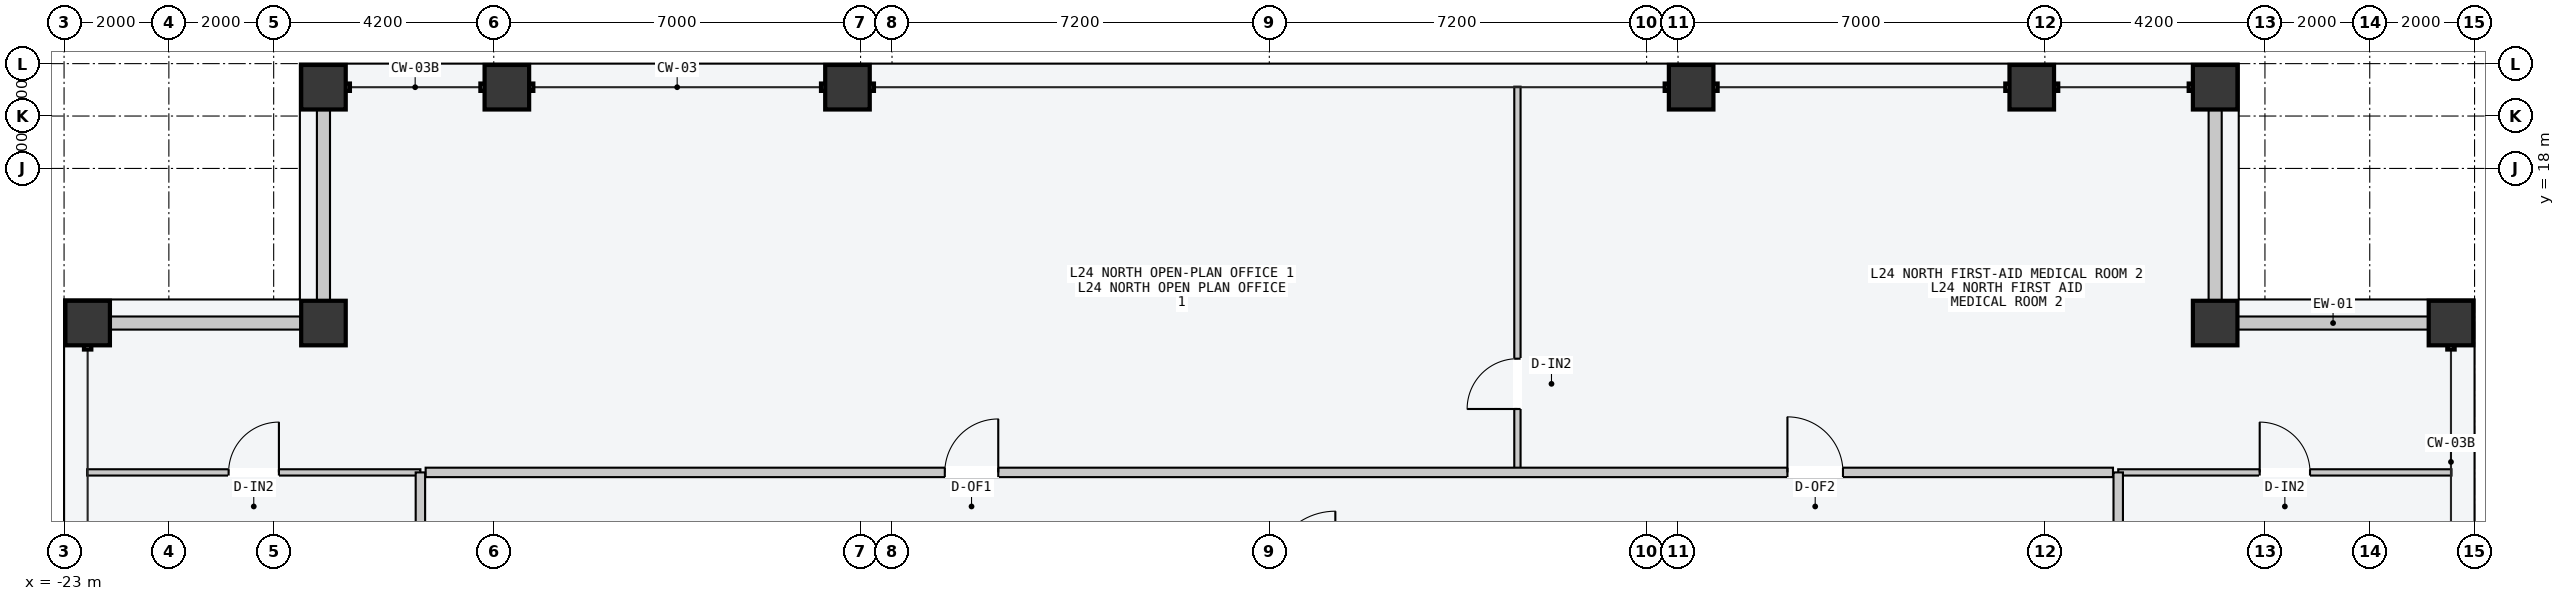
"""IFC4 building model, lengths in metres.
Left out: names, types, materials, properties, quantities, classifications, styles, units other than length and angle.
Written with IfcOpenShell. Run it as: python <this file> out.ifc"""

import sys

from ifc_helpers import new_model, si_unit, direction, frame, frame_2d, origin, origin_2d, place, context, subcontext, project, spatial, rectangle, hollow_rectangle, extrude, element, fill, save


model = new_model("IFC4")
c1 = context("Model", 3, precision=1e-05, world=origin(), true_north=direction((0.0, 1.0)))
c2 = subcontext(c1, "Body", "Model", "MODEL_VIEW")
j1 = project(units=[si_unit("LENGTHUNIT", "METRE"), si_unit("PLANEANGLEUNIT", "RADIAN")], contexts=[c1])
p1 = place(None, origin())
s1 = spatial("IfcSite", under=j1, at=p1, CompositionType="ELEMENT")
p2 = place(p1, origin())
s2 = spatial("IfcBuilding", under=s1, at=p2, CompositionType="ELEMENT")
p3 = place(p2, frame((0.0, 0.0, 95.4)))
s3 = spatial("IfcBuildingStorey", under=s2, at=p3, CompositionType="ELEMENT", Elevation=95.4)
for number, where, z_axis, x_axis in (
    (1, (-18.05, 19.55, 0.0), (0.0, 0.0, 1.0), (1.0, 0.0, 0.0)),
    (2, (-14.55, 19.55, 0.0), (0.0, 0.0, 1.0), (1.0, 0.0, 0.0)),
    (3, (-8.05, 19.55, 0.0), (0.0, 0.0, 1.0), (1.0, 0.0, 0.0)),
    (4, (8.05, 19.55, 0.0), (0.0, 0.0, 1.0), (1.0, 0.0, 0.0)),
    (5, (14.55, 19.55, 0.0), (0.0, 0.0, 1.0), (1.0, 0.0, 0.0)),
    (6, (18.05, 19.55, 0.0), (0.0, 0.0, 1.0), (1.0, 0.0, 0.0)),
    (7, (-22.55, 15.05, 0.0), (0.0, 0.0, 1.0), (0.0, 1.0, 0.0)),
    (8, (22.55, 15.05, 0.0), (0.0, 0.0, 1.0), (0.0, 1.0, 0.0)),
    (9, (-18.05, 15.05, 0.0), (0.0, 0.0, 1.0), (1.0, 0.0, 0.0)),
    (10, (18.05, 15.05, 0.0), (0.0, 0.0, 1.0), (1.0, 0.0, 0.0)),
):
    element("IfcColumn", number, at=place(p3, frame(where, z_axis=z_axis, x_axis=x_axis)), inside=s3, PredefinedType="COLUMN", context=c2, shape_type="SweptSolid", body=[
        extrude(hollow_rectangle(XDim=0.85, YDim=0.85, WallThickness=0.04, at=origin_2d()), origin(), (0.0, 0.0, 1.0), 3.6),
    ])
for number, where, z_axis, x_axis in (
    (11, (-22.115, 15.05, 0.0), (0.0, 0.0, 1.0), (1.0, 0.0, 0.0)),
    (12, (-18.05, 15.485, 0.0), (0.0, 0.0, 1.0), (0.0, 1.0, 0.0)),
    (13, (18.485, 15.05, 0.0), (0.0, 0.0, 1.0), (1.0, 0.0, 0.0)),
    (14, (18.05, 15.485, 0.0), (0.0, 0.0, 1.0), (0.0, 1.0, 0.0)),
):
    element("IfcWall", number, at=place(p3, frame(where, z_axis=z_axis, x_axis=x_axis)), inside=s3, PredefinedType="STANDARD", context=c2, shape_type="SweptSolid", body=[
        extrude(rectangle(XDim=3.63, YDim=0.25, at=frame_2d((1.815, 0.0))), origin(), (0.0, 0.0, 1.0), 2.75),
    ])
p4 = place(p3, frame((4.735, 12.26, 0.0), z_axis=(0.0, 0.0, 1.0), x_axis=(0.0, 1.0, 0.0)))
e15 = element("IfcWall", 15, at=p4, inside=s3, PredefinedType="PARTITIONING", context=c2, shape_type="SweptSolid", body=[
    extrude(rectangle(XDim=7.3, YDim=0.12, at=frame_2d((3.65, 0.0))), origin(), (0.0, 0.0, 1.0), 3.4),
])
p5 = place(p4, frame((1.15, 0.0, 0.0)))
e16 = element("IfcOpeningElement", 16, at=p5, cuts=e15, PredefinedType="OPENING", context=c2, shape_type="SweptSolid", body=[
    extrude(rectangle(XDim=0.96, YDim=2.18, at=frame_2d((0.48, 1.09))), frame((0.0, 0.07, 0.0), z_axis=(0.0, -1.0, 0.0), x_axis=(1.0, 0.0, 0.0)), (0.0, 0.0, 1.0), 0.14),
])
p6 = place(p3, frame((-16.1, 12.2, 0.0), z_axis=(0.0, 0.0, 1.0), x_axis=(1.0, 0.0, 0.0)))
e17 = element("IfcWall", 17, at=p6, inside=s3, PredefinedType="PARTITIONING", context=c2, shape_type="SweptSolid", body=[
    extrude(rectangle(XDim=32.2, YDim=0.18, at=frame_2d((16.1, 0.0))), origin(), (0.0, 0.0, 1.0), 3.4),
])
p7 = place(p6, frame((9.907, 0.0, 0.0)))
e18 = element("IfcOpeningElement", 18, at=p7, cuts=e17, PredefinedType="OPENING", context=c2, shape_type="SweptSolid", body=[
    extrude(rectangle(XDim=1.02, YDim=2.2, at=frame_2d((0.51, 1.1))), frame((0.0, 0.1, 0.0), z_axis=(0.0, -1.0, 0.0), x_axis=(1.0, 0.0, 0.0)), (0.0, 0.0, 1.0), 0.2),
])
p8 = place(p6, frame((25.987, 0.0, 0.0)))
e19 = element("IfcOpeningElement", 19, at=p8, cuts=e17, PredefinedType="OPENING", context=c2, shape_type="SweptSolid", body=[
    extrude(rectangle(XDim=1.06, YDim=2.2, at=frame_2d((0.53, 1.1))), frame((0.0, 0.1, 0.0), z_axis=(0.0, -1.0, 0.0), x_axis=(1.0, 0.0, 0.0)), (0.0, 0.0, 1.0), 0.2),
])
p9 = place(p3, frame((-22.56, 12.2, 0.0), z_axis=(0.0, 0.0, 1.0), x_axis=(1.0, 0.0, 0.0)))
e20 = element("IfcWall", 20, at=p9, inside=s3, PredefinedType="PARTITIONING", context=c2, shape_type="SweptSolid", body=[
    extrude(rectangle(XDim=6.36, YDim=0.12, at=frame_2d((3.18, 0.0))), origin(), (0.0, 0.0, 1.0), 3.4),
])
p10 = place(p9, frame((2.7, 0.0, 0.0)))
e21 = element("IfcOpeningElement", 21, at=p10, cuts=e20, PredefinedType="OPENING", context=c2, shape_type="SweptSolid", body=[
    extrude(rectangle(XDim=0.96, YDim=2.18, at=frame_2d((0.48, 1.09))), frame((0.0, 0.07, 0.0), z_axis=(0.0, -1.0, 0.0), x_axis=(1.0, 0.0, 0.0)), (0.0, 0.0, 1.0), 0.14),
])
p11 = place(p3, frame((16.2, 12.2, 0.0), z_axis=(0.0, 0.0, 1.0), x_axis=(1.0, 0.0, 0.0)))
e22 = element("IfcWall", 22, at=p11, inside=s3, PredefinedType="PARTITIONING", context=c2, shape_type="SweptSolid", body=[
    extrude(rectangle(XDim=6.36, YDim=0.12, at=frame_2d((3.18, 0.0))), origin(), (0.0, 0.0, 1.0), 3.4),
])
p12 = place(p11, frame((2.7, 0.0, 0.0)))
e23 = element("IfcOpeningElement", 23, at=p12, cuts=e22, PredefinedType="OPENING", context=c2, shape_type="SweptSolid", body=[
    extrude(rectangle(XDim=0.96, YDim=2.18, at=frame_2d((0.48, 1.09))), frame((0.0, 0.07, 0.0), z_axis=(0.0, -1.0, 0.0), x_axis=(1.0, 0.0, 0.0)), (0.0, 0.0, 1.0), 0.14),
])
for number, where, z_axis, x_axis in (
    (24, (-16.2, 10.25, 0.0), (0.0, 0.0, 1.0), (0.0, 1.0, 0.0)),
    (25, (16.2, 10.25, 0.0), (0.0, 0.0, 1.0), (0.0, 1.0, 0.0)),
):
    element("IfcWall", number, at=place(p3, frame(where, z_axis=z_axis, x_axis=x_axis)), inside=s3, PredefinedType="PARTITIONING", context=c2, shape_type="SweptSolid", body=[
        extrude(rectangle(XDim=1.95, YDim=0.18, at=frame_2d((0.975, 0.0))), origin(), (0.0, 0.0, 1.0), 3.4),
    ])
p13 = place(p5, origin())
e26 = element("IfcDoor", 26, at=p13, inside=s3, OperationType="SINGLE_SWING_LEFT", PredefinedType="DOOR", context=c2, shape_type="SweptSolid", body=[
    extrude(rectangle(XDim=0.96, YDim=2.18, at=frame_2d((0.48, 1.09))), frame((0.0, 0.025, 0.0), z_axis=(0.0, -1.0, 0.0), x_axis=(1.0, 0.0, 0.0)), (0.0, 0.0, 1.0), 0.05),
])
fill(e16, e26)
p14 = place(p7, origin())
e27 = element("IfcDoor", 27, at=p14, inside=s3, OperationType="SINGLE_SWING_RIGHT", PredefinedType="DOOR", context=c2, shape_type="SweptSolid", body=[
    extrude(rectangle(XDim=1.02, YDim=2.2, at=frame_2d((0.51, 1.1))), frame((0.0, 0.025, 0.0), z_axis=(0.0, -1.0, 0.0), x_axis=(1.0, 0.0, 0.0)), (0.0, 0.0, 1.0), 0.05),
])
fill(e18, e27)
p15 = place(p8, origin())
e28 = element("IfcDoor", 28, at=p15, inside=s3, OperationType="SINGLE_SWING_LEFT", PredefinedType="DOOR", context=c2, shape_type="SweptSolid", body=[
    extrude(rectangle(XDim=1.06, YDim=2.2, at=frame_2d((0.53, 1.1))), frame((0.0, 0.025, 0.0), z_axis=(0.0, -1.0, 0.0), x_axis=(1.0, 0.0, 0.0)), (0.0, 0.0, 1.0), 0.05),
])
fill(e19, e28)
p16 = place(p10, origin())
e29 = element("IfcDoor", 29, at=p16, inside=s3, OperationType="SINGLE_SWING_RIGHT", PredefinedType="DOOR", context=c2, shape_type="SweptSolid", body=[
    extrude(rectangle(XDim=0.96, YDim=2.18, at=frame_2d((0.48, 1.09))), frame((0.0, 0.025, 0.0), z_axis=(0.0, -1.0, 0.0), x_axis=(1.0, 0.0, 0.0)), (0.0, 0.0, 1.0), 0.05),
])
fill(e21, e29)
p17 = place(p12, origin())
e30 = element("IfcDoor", 30, at=p17, inside=s3, OperationType="SINGLE_SWING_LEFT", PredefinedType="DOOR", context=c2, shape_type="SweptSolid", body=[
    extrude(rectangle(XDim=0.96, YDim=2.18, at=frame_2d((0.48, 1.09))), frame((0.0, 0.025, 0.0), z_axis=(0.0, -1.0, 0.0), x_axis=(1.0, 0.0, 0.0)), (0.0, 0.0, 1.0), 0.05),
])
fill(e23, e30)
save(model, sys.argv[1])
